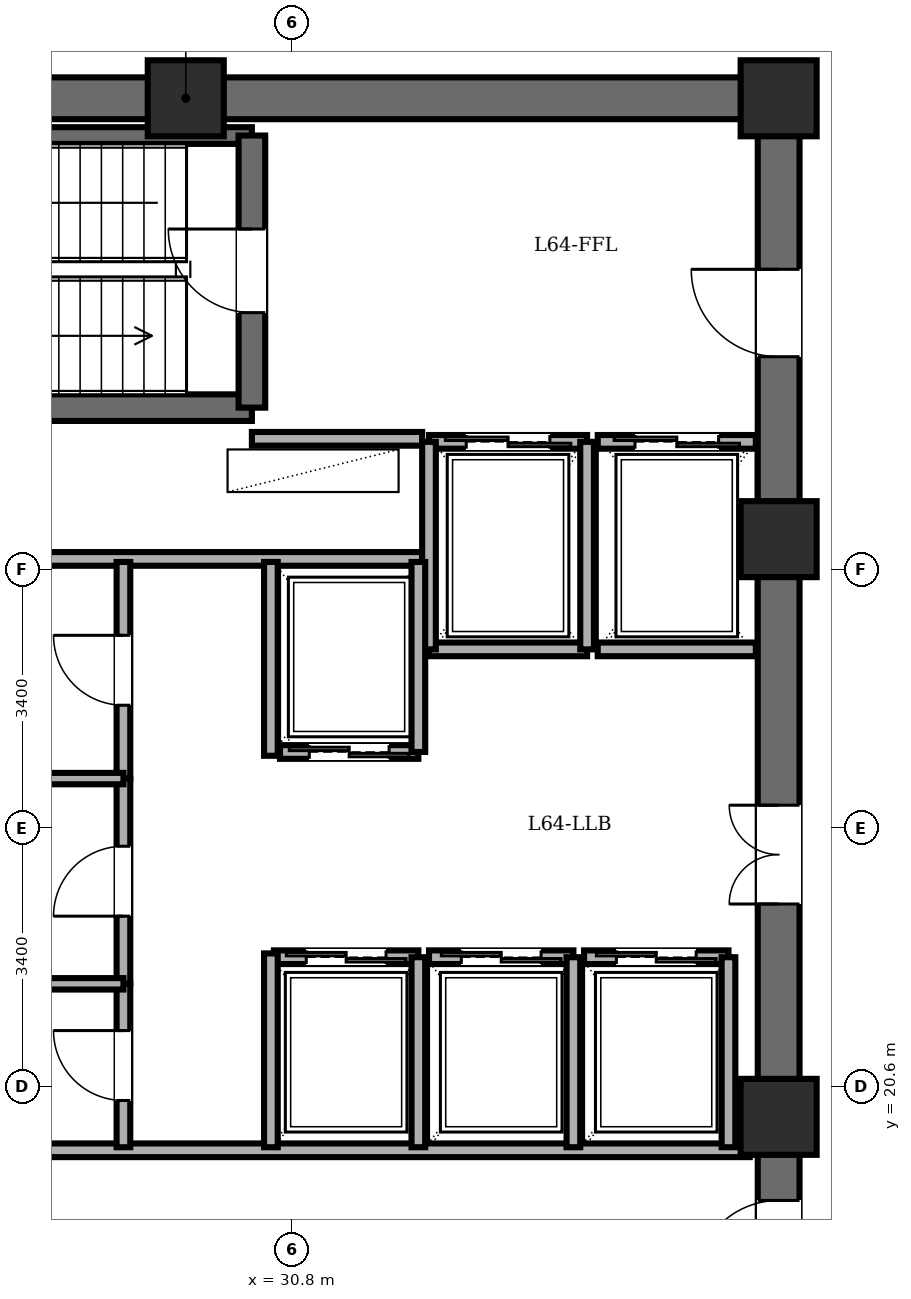
"""IFC4 building model, lengths in metres.
Left out: names, types, materials, properties, quantities, classifications, styles, units other than length and angle.
Written with IfcOpenShell. Run it as: python <this file> out.ifc"""

import sys

from ifc_helpers import new_model, si_unit, direction, frame, frame_2d, origin, origin_2d, place, context, subcontext, project, spatial, rectangle, extrude, element, fill, save


model = new_model("IFC4")
c1 = context("Model", 3, precision=1e-05, world=origin(), true_north=direction((0.0, 1.0)))
c2 = subcontext(c1, "Body", "Model", "MODEL_VIEW")
j1 = project(units=[si_unit("LENGTHUNIT", "METRE"), si_unit("PLANEANGLEUNIT", "RADIAN")], contexts=[c1])
p1 = place(None, origin())
s1 = spatial("IfcSite", under=j1, at=p1, CompositionType="ELEMENT")
p2 = place(p1, origin())
s2 = spatial("IfcBuilding", under=s1, at=p2, CompositionType="ELEMENT")
p3 = place(p2, frame((0.0, 0.0, 244.5)))
s3 = spatial("IfcBuildingStorey", under=s2, at=p3, CompositionType="ELEMENT", Elevation=244.5)
for number, where, z_axis, x_axis in (
    (1, (37.2, 20.2, 0.0), (0.0, 0.0, 1.0), (1.0, 0.0, 0.0)),
    (2, (37.2, 27.8, 0.0), (0.0, 0.0, 1.0), (1.0, 0.0, 0.0)),
    (3, (37.2, 33.6, 0.0), (0.0, 0.0, 1.0), (1.0, 0.0, 0.0)),
    (4, (29.4, 33.6, 0.0), (0.0, 0.0, 1.0), (1.0, 0.0, 0.0)),
):
    element("IfcColumn", number, at=place(p3, frame(where, z_axis=z_axis, x_axis=x_axis)), inside=s3, PredefinedType="COLUMN", context=c2, shape_type="SweptSolid", body=[
        extrude(rectangle(XDim=1.0, YDim=1.0, at=origin_2d()), origin(), (0.0, 0.0, 1.0), 3.6),
    ])
p4 = place(p3, frame((21.6, 33.6, 0.0), z_axis=(0.0, 0.0, 1.0), x_axis=(1.0, 0.0, 0.0)))
e5 = element("IfcWall", 5, at=p4, inside=s3, PredefinedType="SHEAR", context=c2, shape_type="SweptSolid", body=[
    extrude(rectangle(XDim=15.6, YDim=0.55, at=frame_2d((7.8, 0.0))), origin(), (0.0, 0.0, 1.0), 3.36),
])
p5 = place(p3, frame((37.2, 14.4, 0.0), z_axis=(0.0, 0.0, 1.0), x_axis=(0.0, 1.0, 0.0)))
e6 = element("IfcWall", 6, at=p5, inside=s3, PredefinedType="SHEAR", context=c2, shape_type="SweptSolid", body=[
    extrude(rectangle(XDim=19.2, YDim=0.55, at=frame_2d((9.6, 0.0))), origin(), (0.0, 0.0, 1.0), 3.36),
])
p6 = place(p5, frame((15.8, 0.0, 0.0)))
e7 = element("IfcOpeningElement", 7, at=p6, cuts=e6, PredefinedType="OPENING", context=c2, shape_type="SweptSolid", body=[
    extrude(rectangle(XDim=1.15, YDim=2.15, at=frame_2d((0.575, 1.075))), frame((0.0, 0.285, 0.0), z_axis=(0.0, -1.0, 0.0), x_axis=(1.0, 0.0, 0.0)), (0.0, 0.0, 1.0), 0.57),
])
p7 = place(p5, frame((3.6, 0.0, 0.0)))
e8 = element("IfcOpeningElement", 8, at=p7, cuts=e6, PredefinedType="OPENING", context=c2, shape_type="SweptSolid", body=[
    extrude(rectangle(XDim=1.1, YDim=2.15, at=frame_2d((0.55, 1.075))), frame((0.0, 0.285, 0.0), z_axis=(0.0, -1.0, 0.0), x_axis=(1.0, 0.0, 0.0)), (0.0, 0.0, 1.0), 0.57),
])
p8 = place(p5, frame((8.6, 0.0, 0.0)))
e9 = element("IfcOpeningElement", 9, at=p8, cuts=e6, PredefinedType="OPENING", context=c2, shape_type="SweptSolid", body=[
    extrude(rectangle(XDim=1.3, YDim=2.2, at=frame_2d((0.65, 1.1))), frame((0.0, 0.285, 0.0), z_axis=(0.0, -1.0, 0.0), x_axis=(1.0, 0.0, 0.0)), (0.0, 0.0, 1.0), 0.57),
])
p9 = place(p3, frame((22.48, 29.53, 0.0), z_axis=(0.0, 0.0, 1.0), x_axis=(1.0, 0.0, 0.0)))
e10 = element("IfcWall", 10, at=p9, inside=s3, PredefinedType="SOLIDWALL", context=c2, shape_type="SweptSolid", body=[
    extrude(rectangle(XDim=7.79, YDim=0.35, at=frame_2d((3.895, 0.0))), origin(), (0.0, 0.0, 1.0), 3.36),
])
p10 = place(p3, frame((22.48, 33.11, 0.0), z_axis=(0.0, 0.0, 1.0), x_axis=(1.0, 0.0, 0.0)))
e11 = element("IfcWall", 11, at=p10, inside=s3, PredefinedType="PARTITIONING", context=c2, shape_type="SweptSolid", body=[
    extrude(rectangle(XDim=7.79, YDim=0.22, at=frame_2d((3.895, 0.0))), origin(), (0.0, 0.0, 1.0), 3.36),
])
p11 = place(p3, frame((30.27, 29.53, 0.0), z_axis=(0.0, 0.0, 1.0), x_axis=(0.0, 1.0, 0.0)))
e12 = element("IfcWall", 12, at=p11, inside=s3, PredefinedType="SOLIDWALL", context=c2, shape_type="SweptSolid", body=[
    extrude(rectangle(XDim=3.58, YDim=0.35, at=frame_2d((1.79, 0.0))), origin(), (0.0, 0.0, 1.0), 3.36),
])
p12 = place(p11, frame((1.25, 0.0, 0.0)))
e13 = element("IfcOpeningElement", 13, at=p12, cuts=e12, PredefinedType="OPENING", context=c2, shape_type="SweptSolid", body=[
    extrude(rectangle(XDim=1.1, YDim=2.15, at=frame_2d((0.55, 1.075))), frame((0.0, 0.185, 0.0), z_axis=(0.0, -1.0, 0.0), x_axis=(1.0, 0.0, 0.0)), (0.0, 0.0, 1.0), 0.37),
])
p13 = place(p3, frame((30.27, 29.12, 0.0), z_axis=(0.0, 0.0, 1.0), x_axis=(1.0, 0.0, 0.0)))
e14 = element("IfcWall", 14, at=p13, inside=s3, PredefinedType="PARTITIONING", context=c2, shape_type="SweptSolid", body=[
    extrude(rectangle(XDim=2.24, YDim=0.18, at=frame_2d((1.12, 0.0))), origin(), (0.0, 0.0, 1.0), 3.36),
])
p14 = place(p3, frame((21.95, 27.54, 0.0), z_axis=(0.0, 0.0, 1.0), x_axis=(1.0, 0.0, 0.0)))
e15 = element("IfcWall", 15, at=p14, inside=s3, PredefinedType="PARTITIONING", context=c2, shape_type="SweptSolid", body=[
    extrude(rectangle(XDim=10.56, YDim=0.18, at=frame_2d((5.28, 0.0))), origin(), (0.0, 0.0, 1.0), 3.36),
])
p15 = place(p3, frame((21.95, 19.76, 0.0), z_axis=(0.0, 0.0, 1.0), x_axis=(1.0, 0.0, 0.0)))
e16 = element("IfcWall", 16, at=p15, inside=s3, PredefinedType="PARTITIONING", context=c2, shape_type="SweptSolid", body=[
    extrude(rectangle(XDim=14.87, YDim=0.18, at=frame_2d((7.435, 0.0))), origin(), (0.0, 0.0, 1.0), 3.36),
])
p16 = place(p3, frame((32.6, 29.08, 0.0), z_axis=(0.0, 0.0, 1.0), x_axis=(1.0, 0.0, 0.0)))
e17 = element("IfcWall", 17, at=p16, inside=s3, PredefinedType="PARTITIONING", context=c2, shape_type="SweptSolid", body=[
    extrude(rectangle(XDim=2.08, YDim=0.18, at=frame_2d((1.04, 0.0))), origin(), (0.0, 0.0, 1.0), 3.36),
])
p17 = place(p16, frame((0.49, 0.0, 0.0)))
e18 = element("IfcOpeningElement", 18, at=p17, cuts=e17, PredefinedType="OPENING", context=c2, shape_type="SweptSolid", body=[
    extrude(rectangle(XDim=1.1, YDim=2.2, at=frame_2d((0.55, 1.1))), frame((0.0, 0.1, 0.0), z_axis=(0.0, -1.0, 0.0), x_axis=(1.0, 0.0, 0.0)), (0.0, 0.0, 1.0), 0.2),
])
p18 = place(p3, frame((34.68, 26.35, 0.0), z_axis=(0.0, 0.0, 1.0), x_axis=(-1.0, 0.0, 0.0)))
e19 = element("IfcWall", 19, at=p18, inside=s3, PredefinedType="PARTITIONING", context=c2, shape_type="SweptSolid", body=[
    extrude(rectangle(XDim=2.08, YDim=0.18, at=frame_2d((1.04, 0.0))), origin(), (0.0, 0.0, 1.0), 3.36),
])
for number, where, z_axis, x_axis in (
    (20, (34.68, 26.35, 0.0), (0.0, 0.0, 1.0), (0.0, 1.0, 0.0)),
    (21, (32.6, 29.08, 0.0), (0.0, 0.0, 1.0), (0.0, -1.0, 0.0)),
):
    element("IfcWall", number, at=place(p3, frame(where, z_axis=z_axis, x_axis=x_axis)), inside=s3, PredefinedType="PARTITIONING", context=c2, shape_type="SweptSolid", body=[
        extrude(rectangle(XDim=2.73, YDim=0.18, at=frame_2d((1.365, 0.0))), origin(), (0.0, 0.0, 1.0), 3.36),
    ])
p19 = place(p3, frame((34.82, 29.08, 0.0), z_axis=(0.0, 0.0, 1.0), x_axis=(1.0, 0.0, 0.0)))
e22 = element("IfcWall", 22, at=p19, inside=s3, PredefinedType="PARTITIONING", context=c2, shape_type="SweptSolid", body=[
    extrude(rectangle(XDim=2.08, YDim=0.18, at=frame_2d((1.04, 0.0))), origin(), (0.0, 0.0, 1.0), 3.36),
])
p20 = place(p19, frame((0.49, 0.0, 0.0)))
e23 = element("IfcOpeningElement", 23, at=p20, cuts=e22, PredefinedType="OPENING", context=c2, shape_type="SweptSolid", body=[
    extrude(rectangle(XDim=1.1, YDim=2.2, at=frame_2d((0.55, 1.1))), frame((0.0, 0.1, 0.0), z_axis=(0.0, -1.0, 0.0), x_axis=(1.0, 0.0, 0.0)), (0.0, 0.0, 1.0), 0.2),
])
p21 = place(p3, frame((36.9, 26.35, 0.0), z_axis=(0.0, 0.0, 1.0), x_axis=(-1.0, 0.0, 0.0)))
e24 = element("IfcWall", 24, at=p21, inside=s3, PredefinedType="PARTITIONING", context=c2, shape_type="SweptSolid", body=[
    extrude(rectangle(XDim=2.08, YDim=0.18, at=frame_2d((1.04, 0.0))), origin(), (0.0, 0.0, 1.0), 3.36),
])
p22 = place(p3, frame((32.46, 25.0, 0.0), z_axis=(0.0, 0.0, 1.0), x_axis=(-1.0, 0.0, 0.0)))
e25 = element("IfcWall", 25, at=p22, inside=s3, PredefinedType="PARTITIONING", context=c2, shape_type="SweptSolid", body=[
    extrude(rectangle(XDim=1.82, YDim=0.18, at=frame_2d((0.91, 0.0))), origin(), (0.0, 0.0, 1.0), 3.36),
])
p23 = place(p22, frame((0.385, 0.0, 0.0)))
e26 = element("IfcOpeningElement", 26, at=p23, cuts=e25, PredefinedType="OPENING", context=c2, shape_type="SweptSolid", body=[
    extrude(rectangle(XDim=1.05, YDim=2.2, at=frame_2d((0.525, 1.1))), frame((0.0, 0.1, 0.0), z_axis=(0.0, -1.0, 0.0), x_axis=(1.0, 0.0, 0.0)), (0.0, 0.0, 1.0), 0.2),
])
p24 = place(p3, frame((32.46, 25.0, 0.0), z_axis=(0.0, 0.0, 1.0), x_axis=(0.0, 1.0, 0.0)))
e27 = element("IfcWall", 27, at=p24, inside=s3, PredefinedType="PARTITIONING", context=c2, shape_type="SweptSolid", body=[
    extrude(rectangle(XDim=2.5, YDim=0.18, at=frame_2d((1.25, 0.0))), origin(), (0.0, 0.0, 1.0), 3.36),
])
p25 = place(p3, frame((30.56, 22.3, 0.0), z_axis=(0.0, 0.0, 1.0), x_axis=(1.0, 0.0, 0.0)))
e28 = element("IfcWall", 28, at=p25, inside=s3, PredefinedType="PARTITIONING", context=c2, shape_type="SweptSolid", body=[
    extrude(rectangle(XDim=1.9, YDim=0.18, at=frame_2d((0.95, 0.0))), origin(), (0.0, 0.0, 1.0), 3.36),
])
p26 = place(p25, frame((0.425, 0.0, 0.0)))
e29 = element("IfcOpeningElement", 29, at=p26, cuts=e28, PredefinedType="OPENING", context=c2, shape_type="SweptSolid", body=[
    extrude(rectangle(XDim=1.05, YDim=2.2, at=frame_2d((0.525, 1.1))), frame((0.0, 0.1, 0.0), z_axis=(0.0, -1.0, 0.0), x_axis=(1.0, 0.0, 0.0)), (0.0, 0.0, 1.0), 0.2),
])
p27 = place(p3, frame((32.46, 19.8, 0.0), z_axis=(0.0, 0.0, 1.0), x_axis=(0.0, 1.0, 0.0)))
e30 = element("IfcWall", 30, at=p27, inside=s3, PredefinedType="PARTITIONING", context=c2, shape_type="SweptSolid", body=[
    extrude(rectangle(XDim=2.5, YDim=0.18, at=frame_2d((1.25, 0.0))), origin(), (0.0, 0.0, 1.0), 3.36),
])
p28 = place(p3, frame((32.6, 22.3, 0.0), z_axis=(0.0, 0.0, 1.0), x_axis=(1.0, 0.0, 0.0)))
e31 = element("IfcWall", 31, at=p28, inside=s3, PredefinedType="PARTITIONING", context=c2, shape_type="SweptSolid", body=[
    extrude(rectangle(XDim=1.9, YDim=0.18, at=frame_2d((0.95, 0.0))), origin(), (0.0, 0.0, 1.0), 3.36),
])
p29 = place(p28, frame((0.425, 0.0, 0.0)))
e32 = element("IfcOpeningElement", 32, at=p29, cuts=e31, PredefinedType="OPENING", context=c2, shape_type="SweptSolid", body=[
    extrude(rectangle(XDim=1.05, YDim=2.2, at=frame_2d((0.525, 1.1))), frame((0.0, 0.1, 0.0), z_axis=(0.0, -1.0, 0.0), x_axis=(1.0, 0.0, 0.0)), (0.0, 0.0, 1.0), 0.2),
])
p30 = place(p3, frame((34.5, 19.8, 0.0), z_axis=(0.0, 0.0, 1.0), x_axis=(0.0, 1.0, 0.0)))
e33 = element("IfcWall", 33, at=p30, inside=s3, PredefinedType="PARTITIONING", context=c2, shape_type="SweptSolid", body=[
    extrude(rectangle(XDim=2.5, YDim=0.18, at=frame_2d((1.25, 0.0))), origin(), (0.0, 0.0, 1.0), 3.36),
])
p31 = place(p3, frame((34.64, 22.3, 0.0), z_axis=(0.0, 0.0, 1.0), x_axis=(1.0, 0.0, 0.0)))
e34 = element("IfcWall", 34, at=p31, inside=s3, PredefinedType="PARTITIONING", context=c2, shape_type="SweptSolid", body=[
    extrude(rectangle(XDim=1.9, YDim=0.18, at=frame_2d((0.95, 0.0))), origin(), (0.0, 0.0, 1.0), 3.36),
])
p32 = place(p31, frame((0.425, 0.0, 0.0)))
e35 = element("IfcOpeningElement", 35, at=p32, cuts=e34, PredefinedType="OPENING", context=c2, shape_type="SweptSolid", body=[
    extrude(rectangle(XDim=1.05, YDim=2.2, at=frame_2d((0.525, 1.1))), frame((0.0, 0.1, 0.0), z_axis=(0.0, -1.0, 0.0), x_axis=(1.0, 0.0, 0.0)), (0.0, 0.0, 1.0), 0.2),
])
p33 = place(p3, frame((36.54, 19.8, 0.0), z_axis=(0.0, 0.0, 1.0), x_axis=(0.0, 1.0, 0.0)))
e36 = element("IfcWall", 36, at=p33, inside=s3, PredefinedType="PARTITIONING", context=c2, shape_type="SweptSolid", body=[
    extrude(rectangle(XDim=2.5, YDim=0.18, at=frame_2d((1.25, 0.0))), origin(), (0.0, 0.0, 1.0), 3.36),
])
for number, where, z_axis, x_axis in (
    (37, (30.52, 24.95, 0.0), (0.0, 0.0, 1.0), (0.0, 1.0, 0.0)),
    (38, (30.52, 19.8, 0.0), (0.0, 0.0, 1.0), (0.0, 1.0, 0.0)),
):
    element("IfcWall", number, at=place(p3, frame(where, z_axis=z_axis, x_axis=x_axis)), inside=s3, PredefinedType="PARTITIONING", context=c2, shape_type="SweptSolid", body=[
        extrude(rectangle(XDim=2.55, YDim=0.18, at=frame_2d((1.275, 0.0))), origin(), (0.0, 0.0, 1.0), 3.36),
    ])
p34 = place(p3, frame((28.58, 24.65, 0.0), z_axis=(0.0, 0.0, 1.0), x_axis=(0.0, 1.0, 0.0)))
e39 = element("IfcWall", 39, at=p34, inside=s3, PredefinedType="PARTITIONING", context=c2, shape_type="SweptSolid", body=[
    extrude(rectangle(XDim=2.85, YDim=0.18, at=frame_2d((1.425, 0.0))), origin(), (0.0, 0.0, 1.0), 3.36),
])
p35 = place(p34, frame((0.965, 0.0, 0.0)))
e40 = element("IfcOpeningElement", 40, at=p35, cuts=e39, PredefinedType="OPENING", context=c2, shape_type="SweptSolid", body=[
    extrude(rectangle(XDim=0.92, YDim=2.1, at=frame_2d((0.46, 1.05))), frame((0.0, 0.1, 0.0), z_axis=(0.0, -1.0, 0.0), x_axis=(1.0, 0.0, 0.0)), (0.0, 0.0, 1.0), 0.2),
])
p36 = place(p3, frame((28.58, 21.95, 0.0), z_axis=(0.0, 0.0, 1.0), x_axis=(0.0, 1.0, 0.0)))
e41 = element("IfcWall", 41, at=p36, inside=s3, PredefinedType="PARTITIONING", context=c2, shape_type="SweptSolid", body=[
    extrude(rectangle(XDim=2.7, YDim=0.18, at=frame_2d((1.35, 0.0))), origin(), (0.0, 0.0, 1.0), 3.36),
])
p37 = place(p36, frame((0.89, 0.0, 0.0)))
e42 = element("IfcOpeningElement", 42, at=p37, cuts=e41, PredefinedType="OPENING", context=c2, shape_type="SweptSolid", body=[
    extrude(rectangle(XDim=0.92, YDim=2.1, at=frame_2d((0.46, 1.05))), frame((0.0, 0.1, 0.0), z_axis=(0.0, -1.0, 0.0), x_axis=(1.0, 0.0, 0.0)), (0.0, 0.0, 1.0), 0.2),
])
p38 = place(p3, frame((28.58, 19.8, 0.0), z_axis=(0.0, 0.0, 1.0), x_axis=(0.0, 1.0, 0.0)))
e43 = element("IfcWall", 43, at=p38, inside=s3, PredefinedType="PARTITIONING", context=c2, shape_type="SweptSolid", body=[
    extrude(rectangle(XDim=2.15, YDim=0.18, at=frame_2d((1.075, 0.0))), origin(), (0.0, 0.0, 1.0), 3.36),
])
p39 = place(p38, frame((0.615, 0.0, 0.0)))
e44 = element("IfcOpeningElement", 44, at=p39, cuts=e43, PredefinedType="OPENING", context=c2, shape_type="SweptSolid", body=[
    extrude(rectangle(XDim=0.92, YDim=2.1, at=frame_2d((0.46, 1.05))), frame((0.0, 0.1, 0.0), z_axis=(0.0, -1.0, 0.0), x_axis=(1.0, 0.0, 0.0)), (0.0, 0.0, 1.0), 0.2),
])
for number, where, z_axis, x_axis in (
    (45, (21.95, 24.65, 0.0), (0.0, 0.0, 1.0), (1.0, 0.0, 0.0)),
    (46, (21.95, 21.95, 0.0), (0.0, 0.0, 1.0), (1.0, 0.0, 0.0)),
):
    element("IfcWall", number, at=place(p3, frame(where, z_axis=z_axis, x_axis=x_axis)), inside=s3, PredefinedType="PARTITIONING", context=c2, shape_type="SweptSolid", body=[
        extrude(rectangle(XDim=6.63, YDim=0.15, at=frame_2d((3.315, 0.0))), origin(), (0.0, 0.0, 1.0), 3.36),
    ])
p40 = place(p12, origin())
e47 = element("IfcDoor", 47, at=p40, inside=s3, OperationType="SINGLE_SWING_RIGHT", PredefinedType="DOOR", context=c2, shape_type="SweptSolid", body=[
    extrude(rectangle(XDim=1.1, YDim=2.15, at=frame_2d((0.55, 1.075))), frame((0.0, 0.025, 0.0), z_axis=(0.0, -1.0, 0.0), x_axis=(1.0, 0.0, 0.0)), (0.0, 0.0, 1.0), 0.05),
])
fill(e13, e47)
p41 = place(p6, origin())
e48 = element("IfcDoor", 48, at=p41, inside=s3, OperationType="SINGLE_SWING_RIGHT", PredefinedType="DOOR", context=c2, shape_type="SweptSolid", body=[
    extrude(rectangle(XDim=1.15, YDim=2.15, at=frame_2d((0.575, 1.075))), frame((0.0, 0.025, 0.0), z_axis=(0.0, -1.0, 0.0), x_axis=(1.0, 0.0, 0.0)), (0.0, 0.0, 1.0), 0.05),
])
fill(e7, e48)
p42 = place(p7, origin())
e49 = element("IfcDoor", 49, at=p42, inside=s3, OperationType="SINGLE_SWING_LEFT", PredefinedType="DOOR", context=c2, shape_type="SweptSolid", body=[
    extrude(rectangle(XDim=1.1, YDim=2.15, at=frame_2d((0.55, 1.075))), frame((0.0, 0.025, 0.0), z_axis=(0.0, -1.0, 0.0), x_axis=(1.0, 0.0, 0.0)), (0.0, 0.0, 1.0), 0.05),
])
fill(e8, e49)
p43 = place(p17, origin())
e50 = element("IfcDoor", 50, at=p43, inside=s3, OperationType="DOUBLE_DOOR_SLIDING", PredefinedType="DOOR", context=c2, shape_type="SweptSolid", body=[
    extrude(rectangle(XDim=1.1, YDim=2.2, at=frame_2d((0.55, 1.1))), frame((0.0, 0.025, 0.0), z_axis=(0.0, -1.0, 0.0), x_axis=(1.0, 0.0, 0.0)), (0.0, 0.0, 1.0), 0.05),
])
fill(e18, e50)
p44 = place(p20, origin())
e51 = element("IfcDoor", 51, at=p44, inside=s3, OperationType="DOUBLE_DOOR_SLIDING", PredefinedType="DOOR", context=c2, shape_type="SweptSolid", body=[
    extrude(rectangle(XDim=1.1, YDim=2.2, at=frame_2d((0.55, 1.1))), frame((0.0, 0.025, 0.0), z_axis=(0.0, -1.0, 0.0), x_axis=(1.0, 0.0, 0.0)), (0.0, 0.0, 1.0), 0.05),
])
fill(e23, e51)
p45 = place(p23, origin())
e52 = element("IfcDoor", 52, at=p45, inside=s3, OperationType="DOUBLE_DOOR_SLIDING", PredefinedType="DOOR", context=c2, shape_type="SweptSolid", body=[
    extrude(rectangle(XDim=1.05, YDim=2.2, at=frame_2d((0.525, 1.1))), frame((0.0, 0.025, 0.0), z_axis=(0.0, -1.0, 0.0), x_axis=(1.0, 0.0, 0.0)), (0.0, 0.0, 1.0), 0.05),
])
fill(e26, e52)
p46 = place(p26, origin())
e53 = element("IfcDoor", 53, at=p46, inside=s3, OperationType="DOUBLE_DOOR_SLIDING", PredefinedType="DOOR", context=c2, shape_type="SweptSolid", body=[
    extrude(rectangle(XDim=1.05, YDim=2.2, at=frame_2d((0.525, 1.1))), frame((0.0, 0.025, 0.0), z_axis=(0.0, -1.0, 0.0), x_axis=(1.0, 0.0, 0.0)), (0.0, 0.0, 1.0), 0.05),
])
fill(e29, e53)
p47 = place(p29, origin())
e54 = element("IfcDoor", 54, at=p47, inside=s3, OperationType="DOUBLE_DOOR_SLIDING", PredefinedType="DOOR", context=c2, shape_type="SweptSolid", body=[
    extrude(rectangle(XDim=1.05, YDim=2.2, at=frame_2d((0.525, 1.1))), frame((0.0, 0.025, 0.0), z_axis=(0.0, -1.0, 0.0), x_axis=(1.0, 0.0, 0.0)), (0.0, 0.0, 1.0), 0.05),
])
fill(e32, e54)
p48 = place(p32, origin())
e55 = element("IfcDoor", 55, at=p48, inside=s3, OperationType="DOUBLE_DOOR_SLIDING", PredefinedType="DOOR", context=c2, shape_type="SweptSolid", body=[
    extrude(rectangle(XDim=1.05, YDim=2.2, at=frame_2d((0.525, 1.1))), frame((0.0, 0.025, 0.0), z_axis=(0.0, -1.0, 0.0), x_axis=(1.0, 0.0, 0.0)), (0.0, 0.0, 1.0), 0.05),
])
fill(e35, e55)
p49 = place(p35, origin())
e56 = element("IfcDoor", 56, at=p49, inside=s3, OperationType="SINGLE_SWING_RIGHT", PredefinedType="DOOR", context=c2, shape_type="SweptSolid", body=[
    extrude(rectangle(XDim=0.92, YDim=2.1, at=frame_2d((0.46, 1.05))), frame((0.0, 0.025, 0.0), z_axis=(0.0, -1.0, 0.0), x_axis=(1.0, 0.0, 0.0)), (0.0, 0.0, 1.0), 0.05),
])
fill(e40, e56)
p50 = place(p37, origin())
e57 = element("IfcDoor", 57, at=p50, inside=s3, OperationType="SINGLE_SWING_LEFT", PredefinedType="DOOR", context=c2, shape_type="SweptSolid", body=[
    extrude(rectangle(XDim=0.92, YDim=2.1, at=frame_2d((0.46, 1.05))), frame((0.0, 0.025, 0.0), z_axis=(0.0, -1.0, 0.0), x_axis=(1.0, 0.0, 0.0)), (0.0, 0.0, 1.0), 0.05),
])
fill(e42, e57)
p51 = place(p39, origin())
e58 = element("IfcDoor", 58, at=p51, inside=s3, OperationType="SINGLE_SWING_RIGHT", PredefinedType="DOOR", context=c2, shape_type="SweptSolid", body=[
    extrude(rectangle(XDim=0.92, YDim=2.1, at=frame_2d((0.46, 1.05))), frame((0.0, 0.025, 0.0), z_axis=(0.0, -1.0, 0.0), x_axis=(1.0, 0.0, 0.0)), (0.0, 0.0, 1.0), 0.05),
])
fill(e44, e58)
p52 = place(p8, origin())
e59 = element("IfcDoor", 59, at=p52, inside=s3, OperationType="DOUBLE_DOOR_SINGLE_SWING", PredefinedType="DOOR", context=c2, shape_type="SweptSolid", body=[
    extrude(rectangle(XDim=1.3, YDim=2.2, at=frame_2d((0.65, 1.1))), frame((0.0, 0.025, 0.0), z_axis=(0.0, -1.0, 0.0), x_axis=(1.0, 0.0, 0.0)), (0.0, 0.0, 1.0), 0.05),
])
fill(e9, e59)
save(model, sys.argv[1])
